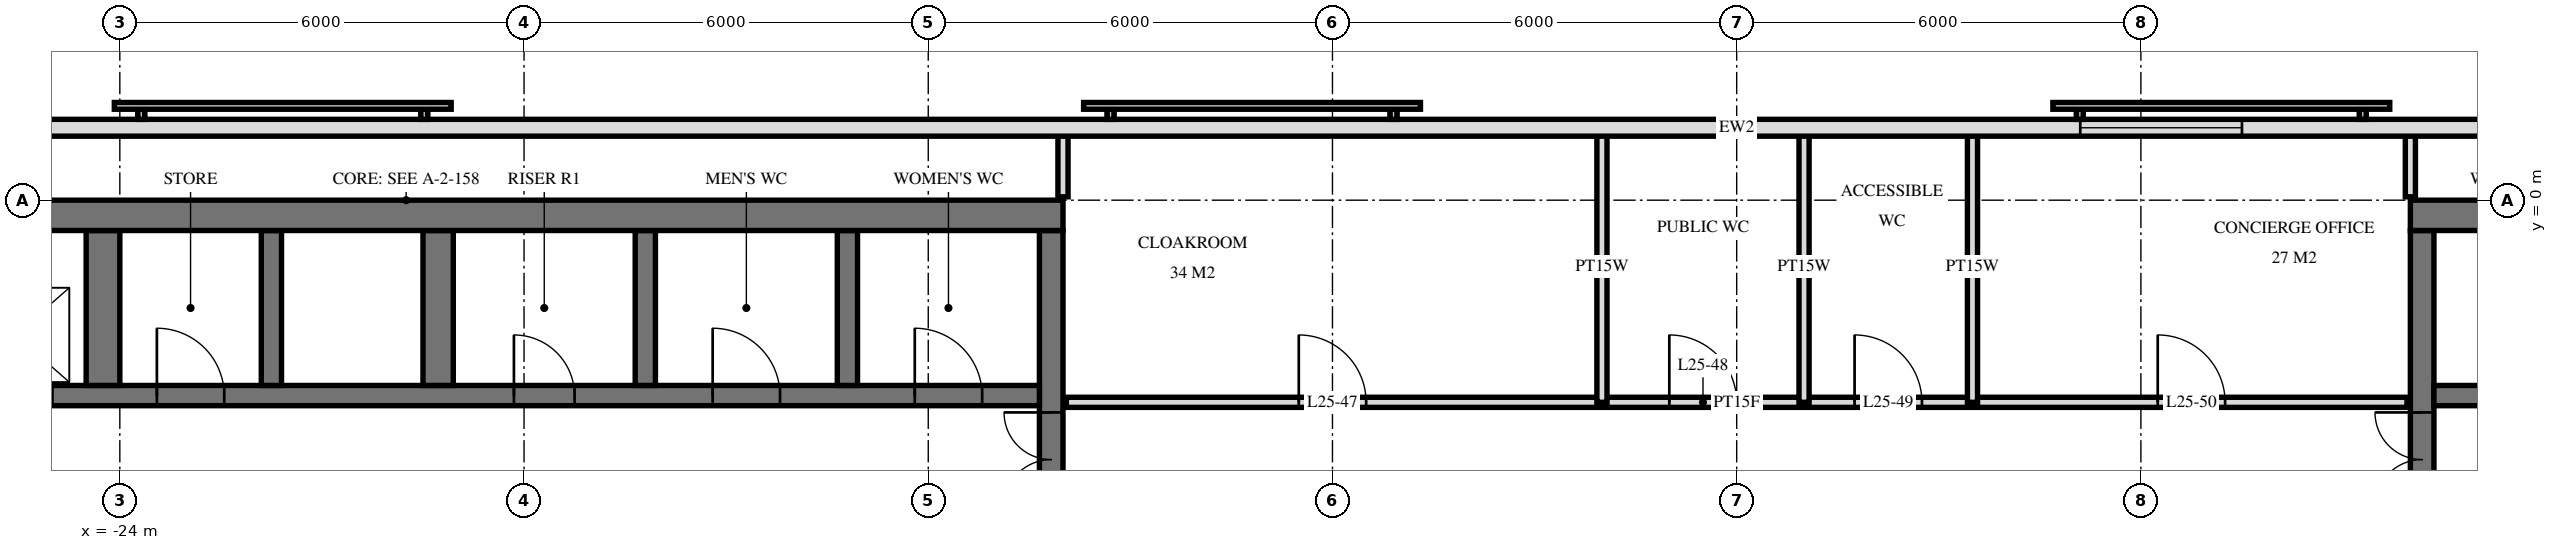
"""IFC4 building model, lengths in metres.
Left out: names, types, materials, properties, quantities, classifications, styles, units other than length and angle.
Written with IfcOpenShell. Run it as: python <this file> out.ifc"""

import sys

from ifc_helpers import new_model, si_unit, direction, frame, frame_2d, origin, place, context, subcontext, project, spatial, rectangle, extrude, element, fill, save


model = new_model("IFC4")
c1 = context("Model", 3, precision=1e-05, world=origin(), true_north=direction((0.0, 1.0)))
c2 = subcontext(c1, "Body", "Model", "MODEL_VIEW")
j1 = project(units=[si_unit("LENGTHUNIT", "METRE"), si_unit("PLANEANGLEUNIT", "RADIAN")], contexts=[c1])
p1 = place(None, origin())
s1 = spatial("IfcSite", under=j1, at=p1, CompositionType="ELEMENT")
p2 = place(p1, origin())
s2 = spatial("IfcBuilding", under=s1, at=p2, CompositionType="ELEMENT")
p3 = place(p2, frame((0.0, 0.0, 99.6)))
s3 = spatial("IfcBuildingStorey", under=s2, at=p3, CompositionType="ELEMENT", Elevation=99.6)
p4 = place(p3, frame((-29.5, -0.225, 0.0), z_axis=(0.0, 0.0, 1.0), x_axis=(1.0, 0.0, 0.0)))
e1 = element("IfcWall", 1, at=p4, inside=s3, PredefinedType="SHEAR", context=c2, shape_type="SweptSolid", body=[
    extrude(rectangle(XDim=19.5, YDim=0.45, at=frame_2d((9.75, 0.0))), origin(), (0.0, 0.0, 1.0), 3.6),
])
p5 = place(p3, frame((-10.175, -14.55, 0.0), z_axis=(0.0, 0.0, 1.0), x_axis=(0.0, 1.0, 0.0)))
e2 = element("IfcWall", 2, at=p5, inside=s3, PredefinedType="SHEAR", context=c2, shape_type="SweptSolid", body=[
    extrude(rectangle(XDim=14.1, YDim=0.35, at=frame_2d((7.05, 0.0))), origin(), (0.0, 0.0, 1.0), 3.6),
])
p6 = place(p5, frame((8.4, 0.0, 0.0)))
e3 = element("IfcOpeningElement", 3, at=p6, cuts=e2, PredefinedType="OPENING", context=c2, shape_type="SweptSolid", body=[
    extrude(rectangle(XDim=1.4, YDim=2.4, at=frame_2d((0.7, 1.2))), frame((0.0, 0.185, 0.0), z_axis=(0.0, -1.0, 0.0), x_axis=(1.0, 0.0, 0.0)), (0.0, 0.0, 1.0), 0.37),
])
p7 = place(p5, frame((10.0, 0.0, 0.0)))
e4 = element("IfcOpeningElement", 4, at=p7, cuts=e2, PredefinedType="OPENING", context=c2, shape_type="SweptSolid", body=[
    extrude(rectangle(XDim=1.4, YDim=2.4, at=frame_2d((0.7, 1.2))), frame((0.0, 0.185, 0.0), z_axis=(0.0, -1.0, 0.0), x_axis=(1.0, 0.0, 0.0)), (0.0, 0.0, 1.0), 0.37),
])
p8 = place(p5, frame((4.0, 0.0, 0.0)))
e5 = element("IfcOpeningElement", 5, at=p8, cuts=e2, PredefinedType="OPENING", context=c2, shape_type="SweptSolid", body=[
    extrude(rectangle(XDim=1.2, YDim=2.1, at=frame_2d((0.6, 1.05))), frame((0.0, 0.185, 0.0), z_axis=(0.0, -1.0, 0.0), x_axis=(1.0, 0.0, 0.0)), (0.0, 0.0, 1.0), 0.37),
])
p9 = place(p3, frame((-29.05, -2.9, 0.0), z_axis=(0.0, 0.0, 1.0), x_axis=(1.0, 0.0, 0.0)))
e6 = element("IfcWall", 6, at=p9, inside=s3, PredefinedType="SHEAR", context=c2, shape_type="SweptSolid", body=[
    extrude(rectangle(XDim=18.7, YDim=0.3, at=frame_2d((9.35, 0.0))), origin(), (0.0, 0.0, 1.0), 3.6),
])
p10 = place(p9, frame((2.95, 0.0, 0.0)))
e7 = element("IfcOpeningElement", 7, at=p10, cuts=e6, PredefinedType="OPENING", context=c2, shape_type="SweptSolid", body=[
    extrude(rectangle(XDim=1.1, YDim=2.1, at=frame_2d((0.55, 1.05))), frame((0.0, 0.16, 0.0), z_axis=(0.0, -1.0, 0.0), x_axis=(1.0, 0.0, 0.0)), (0.0, 0.0, 1.0), 0.32),
])
p11 = place(p9, frame((0.55, 0.0, 0.0)))
e8 = element("IfcOpeningElement", 8, at=p11, cuts=e6, PredefinedType="OPENING", context=c2, shape_type="SweptSolid", body=[
    extrude(rectangle(XDim=1.1, YDim=2.1, at=frame_2d((0.55, 1.05))), frame((0.0, 0.16, 0.0), z_axis=(0.0, -1.0, 0.0), x_axis=(1.0, 0.0, 0.0)), (0.0, 0.0, 1.0), 0.32),
])
p12 = place(p9, frame((10.9, 0.0, 0.0)))
e9 = element("IfcOpeningElement", 9, at=p12, cuts=e6, PredefinedType="OPENING", context=c2, shape_type="SweptSolid", body=[
    extrude(rectangle(XDim=0.9, YDim=2.1, at=frame_2d((0.45, 1.05))), frame((0.0, 0.16, 0.0), z_axis=(0.0, -1.0, 0.0), x_axis=(1.0, 0.0, 0.0)), (0.0, 0.0, 1.0), 0.32),
])
p13 = place(p9, frame((16.85, 0.0, 0.0)))
e10 = element("IfcOpeningElement", 10, at=p13, cuts=e6, PredefinedType="OPENING", context=c2, shape_type="SweptSolid", body=[
    extrude(rectangle(XDim=1.0, YDim=2.1, at=frame_2d((0.5, 1.05))), frame((0.0, 0.16, 0.0), z_axis=(0.0, -1.0, 0.0), x_axis=(1.0, 0.0, 0.0)), (0.0, 0.0, 1.0), 0.32),
])
p14 = place(p9, frame((13.85, 0.0, 0.0)))
e11 = element("IfcOpeningElement", 11, at=p14, cuts=e6, PredefinedType="OPENING", context=c2, shape_type="SweptSolid", body=[
    extrude(rectangle(XDim=1.0, YDim=2.1, at=frame_2d((0.5, 1.05))), frame((0.0, 0.16, 0.0), z_axis=(0.0, -1.0, 0.0), x_axis=(1.0, 0.0, 0.0)), (0.0, 0.0, 1.0), 0.32),
])
p15 = place(p9, frame((5.6, 0.0, 0.0)))
e12 = element("IfcOpeningElement", 12, at=p15, cuts=e6, PredefinedType="OPENING", context=c2, shape_type="SweptSolid", body=[
    extrude(rectangle(XDim=1.0, YDim=2.1, at=frame_2d((0.5, 1.05))), frame((0.0, 0.16, 0.0), z_axis=(0.0, -1.0, 0.0), x_axis=(1.0, 0.0, 0.0)), (0.0, 0.0, 1.0), 0.32),
])
for number, where, z_axis, x_axis in (
    (13, (-13.2, -2.75, 0.0), (0.0, 0.0, 1.0), (0.0, 1.0, 0.0)),
    (14, (-16.2, -2.75, 0.0), (0.0, 0.0, 1.0), (0.0, 1.0, 0.0)),
):
    element("IfcWall", number, at=place(p3, frame(where, z_axis=z_axis, x_axis=x_axis)), inside=s3, PredefinedType="SHEAR", context=c2, shape_type="SweptSolid", body=[
        extrude(rectangle(XDim=2.3, YDim=0.3, at=frame_2d((1.15, 0.0))), origin(), (0.0, 0.0, 1.0), 3.6),
    ])
p16 = place(p3, frame((-19.275, -2.75, 0.0), z_axis=(0.0, 0.0, 1.0), x_axis=(0.0, 1.0, 0.0)))
e15 = element("IfcWall", 15, at=p16, inside=s3, PredefinedType="SHEAR", context=c2, shape_type="SweptSolid", body=[
    extrude(rectangle(XDim=2.3, YDim=0.45, at=frame_2d((1.15, 0.0))), origin(), (0.0, 0.0, 1.0), 3.6),
])
p17 = place(p3, frame((-21.75, -2.75, 0.0), z_axis=(0.0, 0.0, 1.0), x_axis=(0.0, 1.0, 0.0)))
e16 = element("IfcWall", 16, at=p17, inside=s3, PredefinedType="SHEAR", context=c2, shape_type="SweptSolid", body=[
    extrude(rectangle(XDim=2.3, YDim=0.3, at=frame_2d((1.15, 0.0))), origin(), (0.0, 0.0, 1.0), 3.6),
])
p18 = place(p3, frame((-24.25, -2.75, 0.0), z_axis=(0.0, 0.0, 1.0), x_axis=(0.0, 1.0, 0.0)))
e17 = element("IfcWall", 17, at=p18, inside=s3, PredefinedType="SHEAR", context=c2, shape_type="SweptSolid", body=[
    extrude(rectangle(XDim=2.3, YDim=0.5, at=frame_2d((1.15, 0.0))), origin(), (0.0, 0.0, 1.0), 3.6),
])
p19 = place(p3, frame((10.0, -0.225, 0.0), z_axis=(0.0, 0.0, 1.0), x_axis=(1.0, 0.0, 0.0)))
e18 = element("IfcWall", 18, at=p19, inside=s3, PredefinedType="SHEAR", context=c2, shape_type="SweptSolid", body=[
    extrude(rectangle(XDim=19.5, YDim=0.45, at=frame_2d((9.75, 0.0))), origin(), (0.0, 0.0, 1.0), 3.6),
])
p20 = place(p3, frame((10.175, -14.55, 0.0), z_axis=(0.0, 0.0, 1.0), x_axis=(0.0, 1.0, 0.0)))
e19 = element("IfcWall", 19, at=p20, inside=s3, PredefinedType="SHEAR", context=c2, shape_type="SweptSolid", body=[
    extrude(rectangle(XDim=14.1, YDim=0.35, at=frame_2d((7.05, 0.0))), origin(), (0.0, 0.0, 1.0), 3.6),
])
p21 = place(p20, frame((8.4, 0.0, 0.0)))
e20 = element("IfcOpeningElement", 20, at=p21, cuts=e19, PredefinedType="OPENING", context=c2, shape_type="SweptSolid", body=[
    extrude(rectangle(XDim=1.4, YDim=2.4, at=frame_2d((0.7, 1.2))), frame((0.0, 0.185, 0.0), z_axis=(0.0, -1.0, 0.0), x_axis=(1.0, 0.0, 0.0)), (0.0, 0.0, 1.0), 0.37),
])
p22 = place(p20, frame((10.0, 0.0, 0.0)))
e21 = element("IfcOpeningElement", 21, at=p22, cuts=e19, PredefinedType="OPENING", context=c2, shape_type="SweptSolid", body=[
    extrude(rectangle(XDim=1.4, YDim=2.4, at=frame_2d((0.7, 1.2))), frame((0.0, 0.185, 0.0), z_axis=(0.0, -1.0, 0.0), x_axis=(1.0, 0.0, 0.0)), (0.0, 0.0, 1.0), 0.37),
])
p23 = place(p20, frame((4.0, 0.0, 0.0)))
e22 = element("IfcOpeningElement", 22, at=p23, cuts=e19, PredefinedType="OPENING", context=c2, shape_type="SweptSolid", body=[
    extrude(rectangle(XDim=1.2, YDim=2.1, at=frame_2d((0.6, 1.05))), frame((0.0, 0.185, 0.0), z_axis=(0.0, -1.0, 0.0), x_axis=(1.0, 0.0, 0.0)), (0.0, 0.0, 1.0), 0.37),
])
p24 = place(p3, frame((10.35, -2.9, 0.0), z_axis=(0.0, 0.0, 1.0), x_axis=(1.0, 0.0, 0.0)))
e23 = element("IfcWall", 23, at=p24, inside=s3, PredefinedType="SHEAR", context=c2, shape_type="SweptSolid", body=[
    extrude(rectangle(XDim=18.7, YDim=0.3, at=frame_2d((9.35, 0.0))), origin(), (0.0, 0.0, 1.0), 3.6),
])
p25 = place(p24, frame((14.65, 0.0, 0.0)))
e24 = element("IfcOpeningElement", 24, at=p25, cuts=e23, PredefinedType="OPENING", context=c2, shape_type="SweptSolid", body=[
    extrude(rectangle(XDim=1.1, YDim=2.1, at=frame_2d((0.55, 1.05))), frame((0.0, 0.16, 0.0), z_axis=(0.0, -1.0, 0.0), x_axis=(1.0, 0.0, 0.0)), (0.0, 0.0, 1.0), 0.32),
])
p26 = place(p24, frame((17.05, 0.0, 0.0)))
e25 = element("IfcOpeningElement", 25, at=p26, cuts=e23, PredefinedType="OPENING", context=c2, shape_type="SweptSolid", body=[
    extrude(rectangle(XDim=1.1, YDim=2.1, at=frame_2d((0.55, 1.05))), frame((0.0, 0.16, 0.0), z_axis=(0.0, -1.0, 0.0), x_axis=(1.0, 0.0, 0.0)), (0.0, 0.0, 1.0), 0.32),
])
p27 = place(p24, frame((6.9, 0.0, 0.0)))
e26 = element("IfcOpeningElement", 26, at=p27, cuts=e23, PredefinedType="OPENING", context=c2, shape_type="SweptSolid", body=[
    extrude(rectangle(XDim=0.9, YDim=2.1, at=frame_2d((0.45, 1.05))), frame((0.0, 0.16, 0.0), z_axis=(0.0, -1.0, 0.0), x_axis=(1.0, 0.0, 0.0)), (0.0, 0.0, 1.0), 0.32),
])
p28 = place(p24, frame((0.85, 0.0, 0.0)))
e27 = element("IfcOpeningElement", 27, at=p28, cuts=e23, PredefinedType="OPENING", context=c2, shape_type="SweptSolid", body=[
    extrude(rectangle(XDim=1.0, YDim=2.1, at=frame_2d((0.5, 1.05))), frame((0.0, 0.16, 0.0), z_axis=(0.0, -1.0, 0.0), x_axis=(1.0, 0.0, 0.0)), (0.0, 0.0, 1.0), 0.32),
])
p29 = place(p24, frame((3.85, 0.0, 0.0)))
e28 = element("IfcOpeningElement", 28, at=p29, cuts=e23, PredefinedType="OPENING", context=c2, shape_type="SweptSolid", body=[
    extrude(rectangle(XDim=1.0, YDim=2.1, at=frame_2d((0.5, 1.05))), frame((0.0, 0.16, 0.0), z_axis=(0.0, -1.0, 0.0), x_axis=(1.0, 0.0, 0.0)), (0.0, 0.0, 1.0), 0.32),
])
p30 = place(p24, frame((12.1, 0.0, 0.0)))
e29 = element("IfcOpeningElement", 29, at=p30, cuts=e23, PredefinedType="OPENING", context=c2, shape_type="SweptSolid", body=[
    extrude(rectangle(XDim=1.0, YDim=2.1, at=frame_2d((0.5, 1.05))), frame((0.0, 0.16, 0.0), z_axis=(0.0, -1.0, 0.0), x_axis=(1.0, 0.0, 0.0)), (0.0, 0.0, 1.0), 0.32),
])
p31 = place(p3, frame((28.775, 1.075, 0.0), z_axis=(0.0, 0.0, 1.0), x_axis=(-1.0, 0.0, 0.0)))
e30 = element("IfcWall", 30, at=p31, inside=s3, PredefinedType="SOLIDWALL", context=c2, shape_type="SweptSolid", body=[
    extrude(rectangle(XDim=57.551, YDim=0.25, at=frame_2d((28.775, 0.0))), origin(), (0.0, 0.0, 1.0), 3.32),
])
p32 = place(p31, frame((21.275, 0.0, 0.3)))
e31 = element("IfcOpeningElement", 31, at=p32, cuts=e30, PredefinedType="OPENING", context=c2, shape_type="SweptSolid", body=[
    extrude(rectangle(XDim=2.4, YDim=2.1, at=frame_2d((1.2, 1.05))), frame((0.0, 0.135, 0.0), z_axis=(0.0, -1.0, 0.0), x_axis=(1.0, 0.0, 0.0)), (0.0, 0.0, 1.0), 0.27),
])
p33 = place(p3, frame((10.0, 0.05, 0.0), z_axis=(0.0, 0.0, 1.0), x_axis=(0.0, 1.0, 0.0)))
e32 = element("IfcWall", 32, at=p33, inside=s3, PredefinedType="PARTITIONING", context=c2, shape_type="SweptSolid", body=[
    extrude(rectangle(XDim=0.97, YDim=0.15, at=frame_2d((0.485, 0.0))), origin(), (0.0, 0.0, 1.0), 3.32),
])
for number, where, z_axis, x_axis in (
    (33, (3.5, -3.0, 0.0), (0.0, 0.0, 1.0), (0.0, 1.0, 0.0)),
    (34, (1.0, -3.0, 0.0), (0.0, 0.0, 1.0), (0.0, 1.0, 0.0)),
    (35, (-2.0, -3.0, 0.0), (0.0, 0.0, 1.0), (0.0, 1.0, 0.0)),
):
    element("IfcWall", number, at=place(p3, frame(where, z_axis=z_axis, x_axis=x_axis)), inside=s3, PredefinedType="PLUMBINGWALL", context=c2, shape_type="SweptSolid", body=[
        extrude(rectangle(XDim=4.02, YDim=0.15, at=frame_2d((2.01, 0.0))), origin(), (0.0, 0.0, 1.0), 3.32),
    ])
p34 = place(p3, frame((-10.0, 0.05, 0.0), z_axis=(0.0, 0.0, 1.0), x_axis=(0.0, 1.0, 0.0)))
e36 = element("IfcWall", 36, at=p34, inside=s3, PredefinedType="PARTITIONING", context=c2, shape_type="SweptSolid", body=[
    extrude(rectangle(XDim=0.97, YDim=0.15, at=frame_2d((0.485, 0.0))), origin(), (0.0, 0.0, 1.0), 3.32),
])
p35 = place(p3, frame((-9.95, -3.0, 0.0), z_axis=(0.0, 0.0, 1.0), x_axis=(1.0, 0.0, 0.0)))
e37 = element("IfcWall", 37, at=p35, inside=s3, PredefinedType="PARTITIONING", context=c2, shape_type="SweptSolid", body=[
    extrude(rectangle(XDim=19.9, YDim=0.15, at=frame_2d((9.95, 0.0))), origin(), (0.0, 0.0, 1.0), 3.32),
])
p36 = place(p35, frame((3.45, 0.0, 0.0)))
e38 = element("IfcOpeningElement", 38, at=p36, cuts=e37, PredefinedType="OPENING", context=c2, shape_type="SweptSolid", body=[
    extrude(rectangle(XDim=1.0, YDim=2.1, at=frame_2d((0.5, 1.05))), frame((0.0, 0.085, 0.0), z_axis=(0.0, -1.0, 0.0), x_axis=(1.0, 0.0, 0.0)), (0.0, 0.0, 1.0), 0.17),
])
p37 = place(p35, frame((8.95, 0.0, 0.0)))
e39 = element("IfcOpeningElement", 39, at=p37, cuts=e37, PredefinedType="OPENING", context=c2, shape_type="SweptSolid", body=[
    extrude(rectangle(XDim=1.0, YDim=2.1, at=frame_2d((0.5, 1.05))), frame((0.0, 0.085, 0.0), z_axis=(0.0, -1.0, 0.0), x_axis=(1.0, 0.0, 0.0)), (0.0, 0.0, 1.0), 0.17),
])
p38 = place(p35, frame((11.7, 0.0, 0.0)))
e40 = element("IfcOpeningElement", 40, at=p38, cuts=e37, PredefinedType="OPENING", context=c2, shape_type="SweptSolid", body=[
    extrude(rectangle(XDim=1.0, YDim=2.1, at=frame_2d((0.5, 1.05))), frame((0.0, 0.085, 0.0), z_axis=(0.0, -1.0, 0.0), x_axis=(1.0, 0.0, 0.0)), (0.0, 0.0, 1.0), 0.17),
])
p39 = place(p35, frame((16.2, 0.0, 0.0)))
e41 = element("IfcOpeningElement", 41, at=p39, cuts=e37, PredefinedType="OPENING", context=c2, shape_type="SweptSolid", body=[
    extrude(rectangle(XDim=1.0, YDim=2.1, at=frame_2d((0.5, 1.05))), frame((0.0, 0.085, 0.0), z_axis=(0.0, -1.0, 0.0), x_axis=(1.0, 0.0, 0.0)), (0.0, 0.0, 1.0), 0.17),
])
p40 = place(p32, origin())
e42 = element("IfcWindow", 42, at=p40, inside=s3, PartitioningType="SINGLE_PANEL", PredefinedType="WINDOW", context=c2, shape_type="SweptSolid", body=[
    extrude(rectangle(XDim=2.4, YDim=2.1, at=frame_2d((1.2, 1.05))), frame((0.0, 0.03, 0.0), z_axis=(0.0, -1.0, 0.0), x_axis=(1.0, 0.0, 0.0)), (0.0, 0.0, 1.0), 0.06),
])
fill(e31, e42)
p41 = place(p7, origin())
e43 = element("IfcDoor", 43, at=p41, inside=s3, OperationType="DOUBLE_DOOR_SINGLE_SWING", PredefinedType="DOOR", context=c2, shape_type="SweptSolid", body=[
    extrude(rectangle(XDim=1.4, YDim=2.4, at=frame_2d((0.7, 1.2))), frame((0.0, 0.025, 0.0), z_axis=(0.0, -1.0, 0.0), x_axis=(1.0, 0.0, 0.0)), (0.0, 0.0, 1.0), 0.05),
])
fill(e4, e43)
p42 = place(p12, origin())
e44 = element("IfcDoor", 44, at=p42, inside=s3, OperationType="SINGLE_SWING_RIGHT", PredefinedType="DOOR", context=c2, shape_type="SweptSolid", body=[
    extrude(rectangle(XDim=0.9, YDim=2.1, at=frame_2d((0.45, 1.05))), frame((0.0, 0.025, 0.0), z_axis=(0.0, -1.0, 0.0), x_axis=(1.0, 0.0, 0.0)), (0.0, 0.0, 1.0), 0.05),
])
fill(e9, e44)
p43 = place(p13, origin())
e45 = element("IfcDoor", 45, at=p43, inside=s3, OperationType="SINGLE_SWING_RIGHT", PredefinedType="DOOR", context=c2, shape_type="SweptSolid", body=[
    extrude(rectangle(XDim=1.0, YDim=2.1, at=frame_2d((0.5, 1.05))), frame((0.0, 0.025, 0.0), z_axis=(0.0, -1.0, 0.0), x_axis=(1.0, 0.0, 0.0)), (0.0, 0.0, 1.0), 0.05),
])
fill(e10, e45)
p44 = place(p14, origin())
e46 = element("IfcDoor", 46, at=p44, inside=s3, OperationType="SINGLE_SWING_RIGHT", PredefinedType="DOOR", context=c2, shape_type="SweptSolid", body=[
    extrude(rectangle(XDim=1.0, YDim=2.1, at=frame_2d((0.5, 1.05))), frame((0.0, 0.025, 0.0), z_axis=(0.0, -1.0, 0.0), x_axis=(1.0, 0.0, 0.0)), (0.0, 0.0, 1.0), 0.05),
])
fill(e11, e46)
p45 = place(p15, origin())
e47 = element("IfcDoor", 47, at=p45, inside=s3, OperationType="SINGLE_SWING_RIGHT", PredefinedType="DOOR", context=c2, shape_type="SweptSolid", body=[
    extrude(rectangle(XDim=1.0, YDim=2.1, at=frame_2d((0.5, 1.05))), frame((0.0, 0.025, 0.0), z_axis=(0.0, -1.0, 0.0), x_axis=(1.0, 0.0, 0.0)), (0.0, 0.0, 1.0), 0.05),
])
fill(e12, e47)
p46 = place(p22, origin())
e48 = element("IfcDoor", 48, at=p46, inside=s3, OperationType="DOUBLE_DOOR_SINGLE_SWING", PredefinedType="DOOR", context=c2, shape_type="SweptSolid", body=[
    extrude(rectangle(XDim=1.4, YDim=2.4, at=frame_2d((0.7, 1.2))), frame((0.0, 0.025, 0.0), z_axis=(0.0, -1.0, 0.0), x_axis=(1.0, 0.0, 0.0)), (0.0, 0.0, 1.0), 0.05),
])
fill(e21, e48)
p47 = place(p36, origin())
e49 = element("IfcDoor", 49, at=p47, inside=s3, OperationType="SINGLE_SWING_RIGHT", PredefinedType="DOOR", context=c2, shape_type="SweptSolid", body=[
    extrude(rectangle(XDim=1.0, YDim=2.1, at=frame_2d((0.5, 1.05))), frame((0.0, 0.025, 0.0), z_axis=(0.0, -1.0, 0.0), x_axis=(1.0, 0.0, 0.0)), (0.0, 0.0, 1.0), 0.05),
])
fill(e38, e49)
p48 = place(p37, origin())
e50 = element("IfcDoor", 50, at=p48, inside=s3, OperationType="SINGLE_SWING_RIGHT", PredefinedType="DOOR", context=c2, shape_type="SweptSolid", body=[
    extrude(rectangle(XDim=1.0, YDim=2.1, at=frame_2d((0.5, 1.05))), frame((0.0, 0.025, 0.0), z_axis=(0.0, -1.0, 0.0), x_axis=(1.0, 0.0, 0.0)), (0.0, 0.0, 1.0), 0.05),
])
fill(e39, e50)
p49 = place(p38, origin())
e51 = element("IfcDoor", 51, at=p49, inside=s3, OperationType="SINGLE_SWING_RIGHT", PredefinedType="DOOR", context=c2, shape_type="SweptSolid", body=[
    extrude(rectangle(XDim=1.0, YDim=2.1, at=frame_2d((0.5, 1.05))), frame((0.0, 0.025, 0.0), z_axis=(0.0, -1.0, 0.0), x_axis=(1.0, 0.0, 0.0)), (0.0, 0.0, 1.0), 0.05),
])
fill(e40, e51)
p50 = place(p39, origin())
e52 = element("IfcDoor", 52, at=p50, inside=s3, OperationType="SINGLE_SWING_RIGHT", PredefinedType="DOOR", context=c2, shape_type="SweptSolid", body=[
    extrude(rectangle(XDim=1.0, YDim=2.1, at=frame_2d((0.5, 1.05))), frame((0.0, 0.025, 0.0), z_axis=(0.0, -1.0, 0.0), x_axis=(1.0, 0.0, 0.0)), (0.0, 0.0, 1.0), 0.05),
])
fill(e41, e52)
save(model, sys.argv[1])
